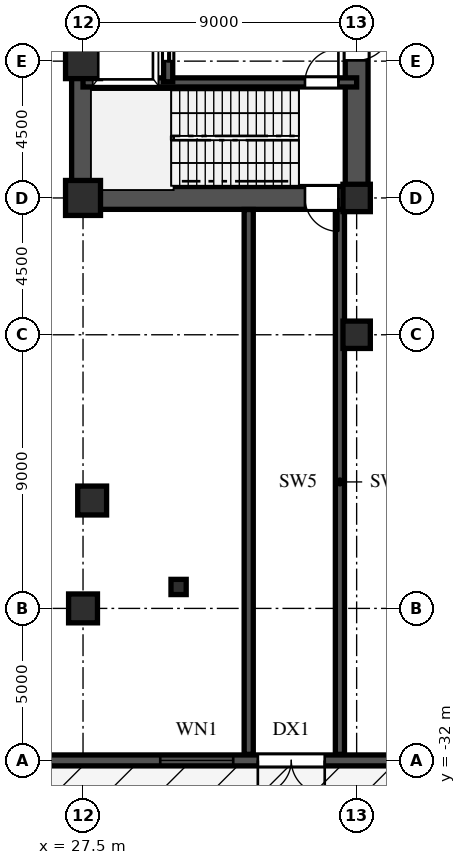
"""IFC4 building model, lengths in metres.
Left out: names, types, materials, properties, quantities, classifications, styles, units other than length and angle.
Written with IfcOpenShell. Run it as: python <this file> out.ifc"""

import sys

from ifc_helpers import new_model, si_unit, direction, frame, frame_2d, origin, origin_2d, place, context, subcontext, project, spatial, rectangle, hollow_rectangle, i_section, extrude, source, transform, mapped, element, fill, save


model = new_model("IFC4")
c1 = context("Model", 3, precision=1e-05, world=origin(), true_north=direction((0.0, 1.0)))
c2 = subcontext(c1, "Body", "Model", "MODEL_VIEW")
j1 = project(units=[si_unit("LENGTHUNIT", "METRE"), si_unit("PLANEANGLEUNIT", "RADIAN")], contexts=[c1])
p1 = place(None, origin())
s1 = spatial("IfcSite", under=j1, at=p1, CompositionType="ELEMENT")
p2 = place(p1, origin())
s2 = spatial("IfcBuilding", under=s1, at=p2, CompositionType="ELEMENT")
p3 = place(p2, origin())
s3 = spatial("IfcBuildingStorey", under=s2, at=p3, CompositionType="ELEMENT", Elevation=0.0)
m1 = source(origin(), c2, "Body", "SweptSolid", [
    extrude(hollow_rectangle(XDim=1.15, YDim=1.15, WallThickness=0.048, at=origin_2d()), origin(), (0.0, 0.0, 1.0), 5.4),
])
for number, where, z_axis, x_axis in (
    (1, (27.5, -13.5, 0.0), (0.0, 0.0, 1.0), (1.0, 0.0, 0.0)),
    (2, (27.5, -9.0, 0.0), (0.0, 0.0, 1.0), (1.0, 0.0, 0.0)),
):
    element("IfcColumn", number, at=place(p3, frame(where, z_axis=z_axis, x_axis=x_axis)), inside=s3, PredefinedType="COLUMN", context=c2, shape_type="MappedRepresentation", body=[
        mapped(m1, transform((0.0, 0.0, 0.0), scale=1.0)),
    ])
m2 = source(origin(), c2, "Body", "SweptSolid", [
    extrude(rectangle(XDim=0.95, YDim=0.95, at=origin_2d()), origin(), (0.0, 0.0, 1.0), 5.4),
])
p4 = place(p3, frame((27.5, -27.0, 0.0), z_axis=(0.0, 0.0, 1.0), x_axis=(1.0, 0.0, 0.0)))
e3 = element("IfcColumn", 3, at=p4, inside=s3, PredefinedType="COLUMN", context=c2, shape_type="MappedRepresentation", body=[
    mapped(m2, transform((0.0, 0.0, 0.0), scale=1.0)),
])
m3 = source(origin(), c2, "Body", "SweptSolid", [
    extrude(i_section(OverallWidth=0.9, OverallDepth=0.9, WebThickness=0.036, FlangeThickness=0.055, at=origin_2d()), origin(), (0.0, 0.0, 1.0), 5.4),
])
for number, where, z_axis, x_axis in (
    (4, (36.5, -18.0, 0.0), (0.0, 0.0, 1.0), (1.0, 0.0, 0.0)),
    (5, (36.5, -13.5, 0.0), (0.0, 0.0, 1.0), (1.0, 0.0, 0.0)),
):
    element("IfcColumn", number, at=place(p3, frame(where, z_axis=z_axis, x_axis=x_axis)), inside=s3, PredefinedType="COLUMN", context=c2, shape_type="MappedRepresentation", body=[
        mapped(m3, transform((0.0, 0.0, 0.0), scale=1.0)),
    ])
m4 = source(origin(), c2, "Body", "SweptSolid", [
    extrude(hollow_rectangle(XDim=0.5, YDim=0.5, WallThickness=0.02, at=origin_2d()), origin(), (0.0, 0.0, 1.0), 5.4),
])
p5 = place(p3, frame((30.643, -26.295, 0.0), z_axis=(0.0, 0.0, 1.0), x_axis=(1.0, 0.0, 0.0)))
e6 = element("IfcColumn", 6, at=p5, inside=s3, PredefinedType="COLUMN", context=c2, shape_type="MappedRepresentation", body=[
    mapped(m4, transform((0.0, 0.0, 0.0), scale=1.0)),
])
p6 = place(p3, frame((27.8, -23.451, 0.0), z_axis=(0.0, 0.0, 1.0), x_axis=(1.0, 0.0, 0.0)))
e7 = element("IfcColumn", 7, at=p6, inside=s3, PredefinedType="COLUMN", context=c2, shape_type="MappedRepresentation", body=[
    mapped(m2, transform((0.0, 0.0, 0.0), scale=1.0)),
])
p7 = place(p3, frame((-71.96, -32.0, 0.0), z_axis=(0.0, 0.0, 1.0), x_axis=(1.0, 0.0, 0.0)))
e8 = element("IfcWall", 8, at=p7, inside=s3, PredefinedType="SOLIDWALL", context=c2, shape_type="SweptSolid", body=[
    extrude(rectangle(XDim=143.92, YDim=0.36, at=frame_2d((71.96, 0.0))), origin(), (0.0, 0.0, 1.0), 5.12),
])
p8 = place(p7, frame((18.0, 0.0, 0.0)))
e9 = element("IfcOpeningElement", 9, at=p8, cuts=e8, PredefinedType="OPENING", context=c2, shape_type="SweptSolid", body=[
    extrude(rectangle(XDim=2.2, YDim=2.4, at=frame_2d((1.1, 1.2))), frame((0.0, 0.19, 0.0), z_axis=(0.0, -1.0, 0.0), x_axis=(1.0, 0.0, 0.0)), (0.0, 0.0, 1.0), 0.38),
])
p9 = place(p7, frame((48.0, 0.0, 0.0)))
e10 = element("IfcOpeningElement", 10, at=p9, cuts=e8, PredefinedType="OPENING", context=c2, shape_type="SweptSolid", body=[
    extrude(rectangle(XDim=1.8, YDim=2.4, at=frame_2d((0.9, 1.2))), frame((0.0, 0.19, 0.0), z_axis=(0.0, -1.0, 0.0), x_axis=(1.0, 0.0, 0.0)), (0.0, 0.0, 1.0), 0.38),
])
p10 = place(p7, frame((57.8, 0.0, 0.0)))
e11 = element("IfcOpeningElement", 11, at=p10, cuts=e8, PredefinedType="OPENING", context=c2, shape_type="SweptSolid", body=[
    extrude(rectangle(XDim=6.2, YDim=3.1, at=frame_2d((3.1, 1.55))), frame((0.0, 0.19, 0.0), z_axis=(0.0, -1.0, 0.0), x_axis=(1.0, 0.0, 0.0)), (0.0, 0.0, 1.0), 0.38),
])
p11 = place(p7, frame((70.7, 0.0, 0.0)))
e12 = element("IfcOpeningElement", 12, at=p11, cuts=e8, PredefinedType="OPENING", context=c2, shape_type="SweptSolid", body=[
    extrude(rectangle(XDim=2.2, YDim=2.4, at=frame_2d((1.1, 1.2))), frame((0.0, 0.19, 0.0), z_axis=(0.0, -1.0, 0.0), x_axis=(1.0, 0.0, 0.0)), (0.0, 0.0, 1.0), 0.38),
])
p12 = place(p7, frame((82.2, 0.0, 0.0)))
e13 = element("IfcOpeningElement", 13, at=p12, cuts=e8, PredefinedType="OPENING", context=c2, shape_type="SweptSolid", body=[
    extrude(rectangle(XDim=1.8, YDim=2.4, at=frame_2d((0.9, 1.2))), frame((0.0, 0.19, 0.0), z_axis=(0.0, -1.0, 0.0), x_axis=(1.0, 0.0, 0.0)), (0.0, 0.0, 1.0), 0.38),
])
p13 = place(p7, frame((120.2, 0.0, 0.0)))
e14 = element("IfcOpeningElement", 14, at=p13, cuts=e8, PredefinedType="OPENING", context=c2, shape_type="SweptSolid", body=[
    extrude(rectangle(XDim=2.2, YDim=2.4, at=frame_2d((1.1, 1.2))), frame((0.0, 0.19, 0.0), z_axis=(0.0, -1.0, 0.0), x_axis=(1.0, 0.0, 0.0)), (0.0, 0.0, 1.0), 0.38),
])
p14 = place(p7, frame((36.51, 0.0, 0.0)))
e15 = element("IfcOpeningElement", 15, at=p14, cuts=e8, PredefinedType="OPENING", context=c2, shape_type="SweptSolid", body=[
    extrude(rectangle(XDim=2.2, YDim=2.4, at=frame_2d((1.1, 1.2))), frame((0.0, 0.19, 0.0), z_axis=(0.0, -1.0, 0.0), x_axis=(1.0, 0.0, 0.0)), (0.0, 0.0, 1.0), 0.38),
])
p15 = place(p7, frame((105.21, 0.0, 0.0)))
e16 = element("IfcOpeningElement", 16, at=p15, cuts=e8, PredefinedType="OPENING", context=c2, shape_type="SweptSolid", body=[
    extrude(rectangle(XDim=2.2, YDim=2.4, at=frame_2d((1.1, 1.2))), frame((0.0, 0.19, 0.0), z_axis=(0.0, -1.0, 0.0), x_axis=(1.0, 0.0, 0.0)), (0.0, 0.0, 1.0), 0.38),
])
p16 = place(p7, frame((6.0, 0.0, 0.9)))
e17 = element("IfcOpeningElement", 17, at=p16, cuts=e8, PredefinedType="OPENING", context=c2, shape_type="SweptSolid", body=[
    extrude(rectangle(XDim=2.4, YDim=2.2, at=frame_2d((1.2, 1.1))), frame((0.0, 0.19, 0.0), z_axis=(0.0, -1.0, 0.0), x_axis=(1.0, 0.0, 0.0)), (0.0, 0.0, 1.0), 0.38),
])
p17 = place(p7, frame((12.0, 0.0, 0.9)))
e18 = element("IfcOpeningElement", 18, at=p17, cuts=e8, PredefinedType="OPENING", context=c2, shape_type="SweptSolid", body=[
    extrude(rectangle(XDim=2.4, YDim=2.2, at=frame_2d((1.2, 1.1))), frame((0.0, 0.19, 0.0), z_axis=(0.0, -1.0, 0.0), x_axis=(1.0, 0.0, 0.0)), (0.0, 0.0, 1.0), 0.38),
])
p18 = place(p7, frame((28.0, 0.0, 0.9)))
e19 = element("IfcOpeningElement", 19, at=p18, cuts=e8, PredefinedType="OPENING", context=c2, shape_type="SweptSolid", body=[
    extrude(rectangle(XDim=2.4, YDim=2.2, at=frame_2d((1.2, 1.1))), frame((0.0, 0.19, 0.0), z_axis=(0.0, -1.0, 0.0), x_axis=(1.0, 0.0, 0.0)), (0.0, 0.0, 1.0), 0.38),
])
p19 = place(p7, frame((91.0, 0.0, 0.9)))
e20 = element("IfcOpeningElement", 20, at=p19, cuts=e8, PredefinedType="OPENING", context=c2, shape_type="SweptSolid", body=[
    extrude(rectangle(XDim=2.4, YDim=2.2, at=frame_2d((1.2, 1.1))), frame((0.0, 0.19, 0.0), z_axis=(0.0, -1.0, 0.0), x_axis=(1.0, 0.0, 0.0)), (0.0, 0.0, 1.0), 0.38),
])
p20 = place(p7, frame((102.0, 0.0, 0.9)))
e21 = element("IfcOpeningElement", 21, at=p20, cuts=e8, PredefinedType="OPENING", context=c2, shape_type="SweptSolid", body=[
    extrude(rectangle(XDim=2.4, YDim=2.2, at=frame_2d((1.2, 1.1))), frame((0.0, 0.19, 0.0), z_axis=(0.0, -1.0, 0.0), x_axis=(1.0, 0.0, 0.0)), (0.0, 0.0, 1.0), 0.38),
])
p21 = place(p7, frame((110.0, 0.0, 0.9)))
e22 = element("IfcOpeningElement", 22, at=p21, cuts=e8, PredefinedType="OPENING", context=c2, shape_type="SweptSolid", body=[
    extrude(rectangle(XDim=2.4, YDim=2.2, at=frame_2d((1.2, 1.1))), frame((0.0, 0.19, 0.0), z_axis=(0.0, -1.0, 0.0), x_axis=(1.0, 0.0, 0.0)), (0.0, 0.0, 1.0), 0.38),
])
p22 = place(p7, frame((130.0, 0.0, 0.9)))
e23 = element("IfcOpeningElement", 23, at=p22, cuts=e8, PredefinedType="OPENING", context=c2, shape_type="SweptSolid", body=[
    extrude(rectangle(XDim=2.4, YDim=2.2, at=frame_2d((1.2, 1.1))), frame((0.0, 0.19, 0.0), z_axis=(0.0, -1.0, 0.0), x_axis=(1.0, 0.0, 0.0)), (0.0, 0.0, 1.0), 0.38),
])
p23 = place(p3, frame((27.5, -13.5, 0.0), z_axis=(0.0, 0.0, 1.0), x_axis=(0.0, 1.0, 0.0)))
e24 = element("IfcWall", 24, at=p23, inside=s3, PredefinedType="SHEAR", context=c2, shape_type="SweptSolid", body=[
    extrude(rectangle(XDim=12.2, YDim=0.75, at=frame_2d((6.1, 0.0))), origin(), (0.0, 0.0, 1.0), 5.12),
])
p24 = place(p3, frame((27.5, -13.5, 0.0), z_axis=(0.0, 0.0, 1.0), x_axis=(1.0, 0.0, 0.0)))
e25 = element("IfcWall", 25, at=p24, inside=s3, PredefinedType="SHEAR", context=c2, shape_type="SweptSolid", body=[
    extrude(rectangle(XDim=9.0, YDim=0.75, at=frame_2d((4.5, 0.0))), origin(), (0.0, 0.0, 1.0), 5.12),
])
p25 = place(p24, frame((7.3, 0.0, 0.0)))
e26 = element("IfcOpeningElement", 26, at=p25, cuts=e25, PredefinedType="OPENING", context=c2, shape_type="SweptSolid", body=[
    extrude(rectangle(XDim=1.1, YDim=2.2, at=frame_2d((0.55, 1.1))), frame((0.0, 0.385, 0.0), z_axis=(0.0, -1.0, 0.0), x_axis=(1.0, 0.0, 0.0)), (0.0, 0.0, 1.0), 0.77),
])
p26 = place(p3, frame((36.5, -13.65, 0.0), z_axis=(0.0, 0.0, 1.0), x_axis=(0.0, 1.0, 0.0)))
e27 = element("IfcWall", 27, at=p26, inside=s3, PredefinedType="SHEAR", context=c2, shape_type="SweptSolid", body=[
    extrude(rectangle(XDim=7.15, YDim=0.75, at=frame_2d((3.575, 0.0))), origin(), (0.0, 0.0, 1.0), 5.12),
])
p27 = place(p26, frame((4.675, 0.0, 0.0)))
e28 = element("IfcOpeningElement", 28, at=p27, cuts=e27, PredefinedType="OPENING", context=c2, shape_type="SweptSolid", body=[
    extrude(rectangle(XDim=1.15, YDim=2.2, at=frame_2d((0.575, 1.1))), frame((0.0, 0.385, 0.0), z_axis=(0.0, -1.0, 0.0), x_axis=(1.0, 0.0, 0.0)), (0.0, 0.0, 1.0), 0.77),
])
p28 = place(p3, frame((27.5, -9.7, 0.0), z_axis=(0.0, 0.0, 1.0), x_axis=(1.0, 0.0, 0.0)))
e29 = element("IfcWall", 29, at=p28, inside=s3, PredefinedType="SHEAR", context=c2, shape_type="SweptSolid", body=[
    extrude(rectangle(XDim=9.0, YDim=0.3, at=frame_2d((4.5, 0.0))), origin(), (0.0, 0.0, 1.0), 5.12),
])
p29 = place(p28, frame((7.3, 0.0, 0.0)))
e30 = element("IfcOpeningElement", 30, at=p29, cuts=e29, PredefinedType="OPENING", context=c2, shape_type="SweptSolid", body=[
    extrude(rectangle(XDim=1.1, YDim=2.2, at=frame_2d((0.55, 1.1))), frame((0.0, 0.16, 0.0), z_axis=(0.0, -1.0, 0.0), x_axis=(1.0, 0.0, 0.0)), (0.0, 0.0, 1.0), 0.32),
])
p30 = place(p3, frame((30.3, -9.68, 0.0), z_axis=(0.0, 0.0, 1.0), x_axis=(0.0, 1.0, 0.0)))
e31 = element("IfcWall", 31, at=p30, inside=s3, PredefinedType="SHEAR", context=c2, shape_type="SweptSolid", body=[
    extrude(rectangle(XDim=2.56, YDim=0.3, at=frame_2d((1.28, 0.0))), origin(), (0.0, 0.0, 1.0), 5.12),
])
p31 = place(p30, frame((0.68, 0.0, 0.0)))
e32 = element("IfcOpeningElement", 32, at=p31, cuts=e31, PredefinedType="OPENING", context=c2, shape_type="SweptSolid", body=[
    extrude(rectangle(XDim=1.2, YDim=2.25, at=frame_2d((0.6, 1.125))), frame((0.0, 0.16, 0.0), z_axis=(0.0, -1.0, 0.0), x_axis=(1.0, 0.0, 0.0)), (0.0, 0.0, 1.0), 0.32),
])
for number, where, z_axis, x_axis in (
    (33, (32.95, -31.8, 0.0), (0.0, 0.0, 1.0), (0.0, 1.0, 0.0)),
    (34, (35.95, -31.8, 0.0), (0.0, 0.0, 1.0), (0.0, 1.0, 0.0)),
):
    element("IfcWall", number, at=place(p3, frame(where, z_axis=z_axis, x_axis=x_axis)), inside=s3, PredefinedType="SHEAR", context=c2, shape_type="SweptSolid", body=[
        extrude(rectangle(XDim=17.92, YDim=0.3, at=frame_2d((8.96, 0.0))), origin(), (0.0, 0.0, 1.0), 5.12),
    ])
m5 = source(origin(), c2, "Body", "SweptSolid", [
    extrude(rectangle(XDim=2.2, YDim=2.4, at=frame_2d((1.1, 1.2))), frame((0.0, 0.025, 0.0), z_axis=(0.0, -1.0, 0.0), x_axis=(1.0, 0.0, 0.0)), (0.0, 0.0, 1.0), 0.05),
])
p32 = place(p15, frame((2.2, 0.0, 0.0), z_axis=(0.0, 0.0, 1.0), x_axis=(-1.0, 0.0, 0.0)))
e35 = element("IfcDoor", 35, at=p32, inside=s3, OperationType="DOUBLE_SWING_LEFT", PredefinedType="DOOR", context=c2, shape_type="MappedRepresentation", body=[
    mapped(m5, transform((0.0, 0.0, 0.0), scale=1.0)),
])
fill(e16, e35)
m6 = source(origin(), c2, "Body", "SweptSolid", [
    extrude(rectangle(XDim=2.4, YDim=2.2, at=frame_2d((1.2, 1.1))), frame((0.0, 0.03, 0.0), z_axis=(0.0, -1.0, 0.0), x_axis=(1.0, 0.0, 0.0)), (0.0, 0.0, 1.0), 0.06),
])
p33 = place(p20, origin())
e36 = element("IfcWindow", 36, at=p33, inside=s3, PartitioningType="SINGLE_PANEL", PredefinedType="WINDOW", context=c2, shape_type="MappedRepresentation", body=[
    mapped(m6, transform((0.0, 0.0, 0.0), scale=1.0)),
])
fill(e21, e36)
m7 = source(origin(), c2, "Body", "SweptSolid", [
    extrude(rectangle(XDim=1.1, YDim=2.2, at=frame_2d((0.55, 1.1))), frame((0.0, 0.025, 0.0), z_axis=(0.0, -1.0, 0.0), x_axis=(1.0, 0.0, 0.0)), (0.0, 0.0, 1.0), 0.05),
])
p34 = place(p25, frame((1.1, 0.0, 0.0), z_axis=(0.0, 0.0, 1.0), x_axis=(-1.0, 0.0, 0.0)))
e37 = element("IfcDoor", 37, at=p34, inside=s3, OperationType="SINGLE_SWING_RIGHT", PredefinedType="DOOR", context=c2, shape_type="MappedRepresentation", body=[
    mapped(m7, transform((0.0, 0.0, 0.0), scale=1.0)),
])
fill(e26, e37)
m8 = source(origin(), c2, "Body", "SweptSolid", [
    extrude(rectangle(XDim=1.15, YDim=2.2, at=frame_2d((0.575, 1.1))), frame((0.0, 0.025, 0.0), z_axis=(0.0, -1.0, 0.0), x_axis=(1.0, 0.0, 0.0)), (0.0, 0.0, 1.0), 0.05),
])
p35 = place(p27, frame((1.15, 0.0, 0.0), z_axis=(0.0, 0.0, 1.0), x_axis=(-1.0, 0.0, 0.0)))
e38 = element("IfcDoor", 38, at=p35, inside=s3, OperationType="SINGLE_SWING_RIGHT", PredefinedType="DOOR", context=c2, shape_type="MappedRepresentation", body=[
    mapped(m8, transform((0.0, 0.0, 0.0), scale=1.0)),
])
fill(e28, e38)
p36 = place(p29, origin())
e39 = element("IfcDoor", 39, at=p36, inside=s3, OperationType="SINGLE_SWING_RIGHT", PredefinedType="DOOR", context=c2, shape_type="MappedRepresentation", body=[
    mapped(m7, transform((0.0, 0.0, 0.0), scale=1.0)),
])
fill(e30, e39)
m9 = source(origin(), c2, "Body", "SweptSolid", [
    extrude(rectangle(XDim=1.2, YDim=2.25, at=frame_2d((0.6, 1.125))), frame((0.0, 0.025, 0.0), z_axis=(0.0, -1.0, 0.0), x_axis=(1.0, 0.0, 0.0)), (0.0, 0.0, 1.0), 0.05),
])
p37 = place(p31, origin())
e40 = element("IfcDoor", 40, at=p37, inside=s3, OperationType="DOUBLE_DOOR_SLIDING", PredefinedType="DOOR", context=c2, shape_type="MappedRepresentation", body=[
    mapped(m9, transform((0.0, 0.0, 0.0), scale=1.0)),
])
fill(e32, e40)
save(model, sys.argv[1])
